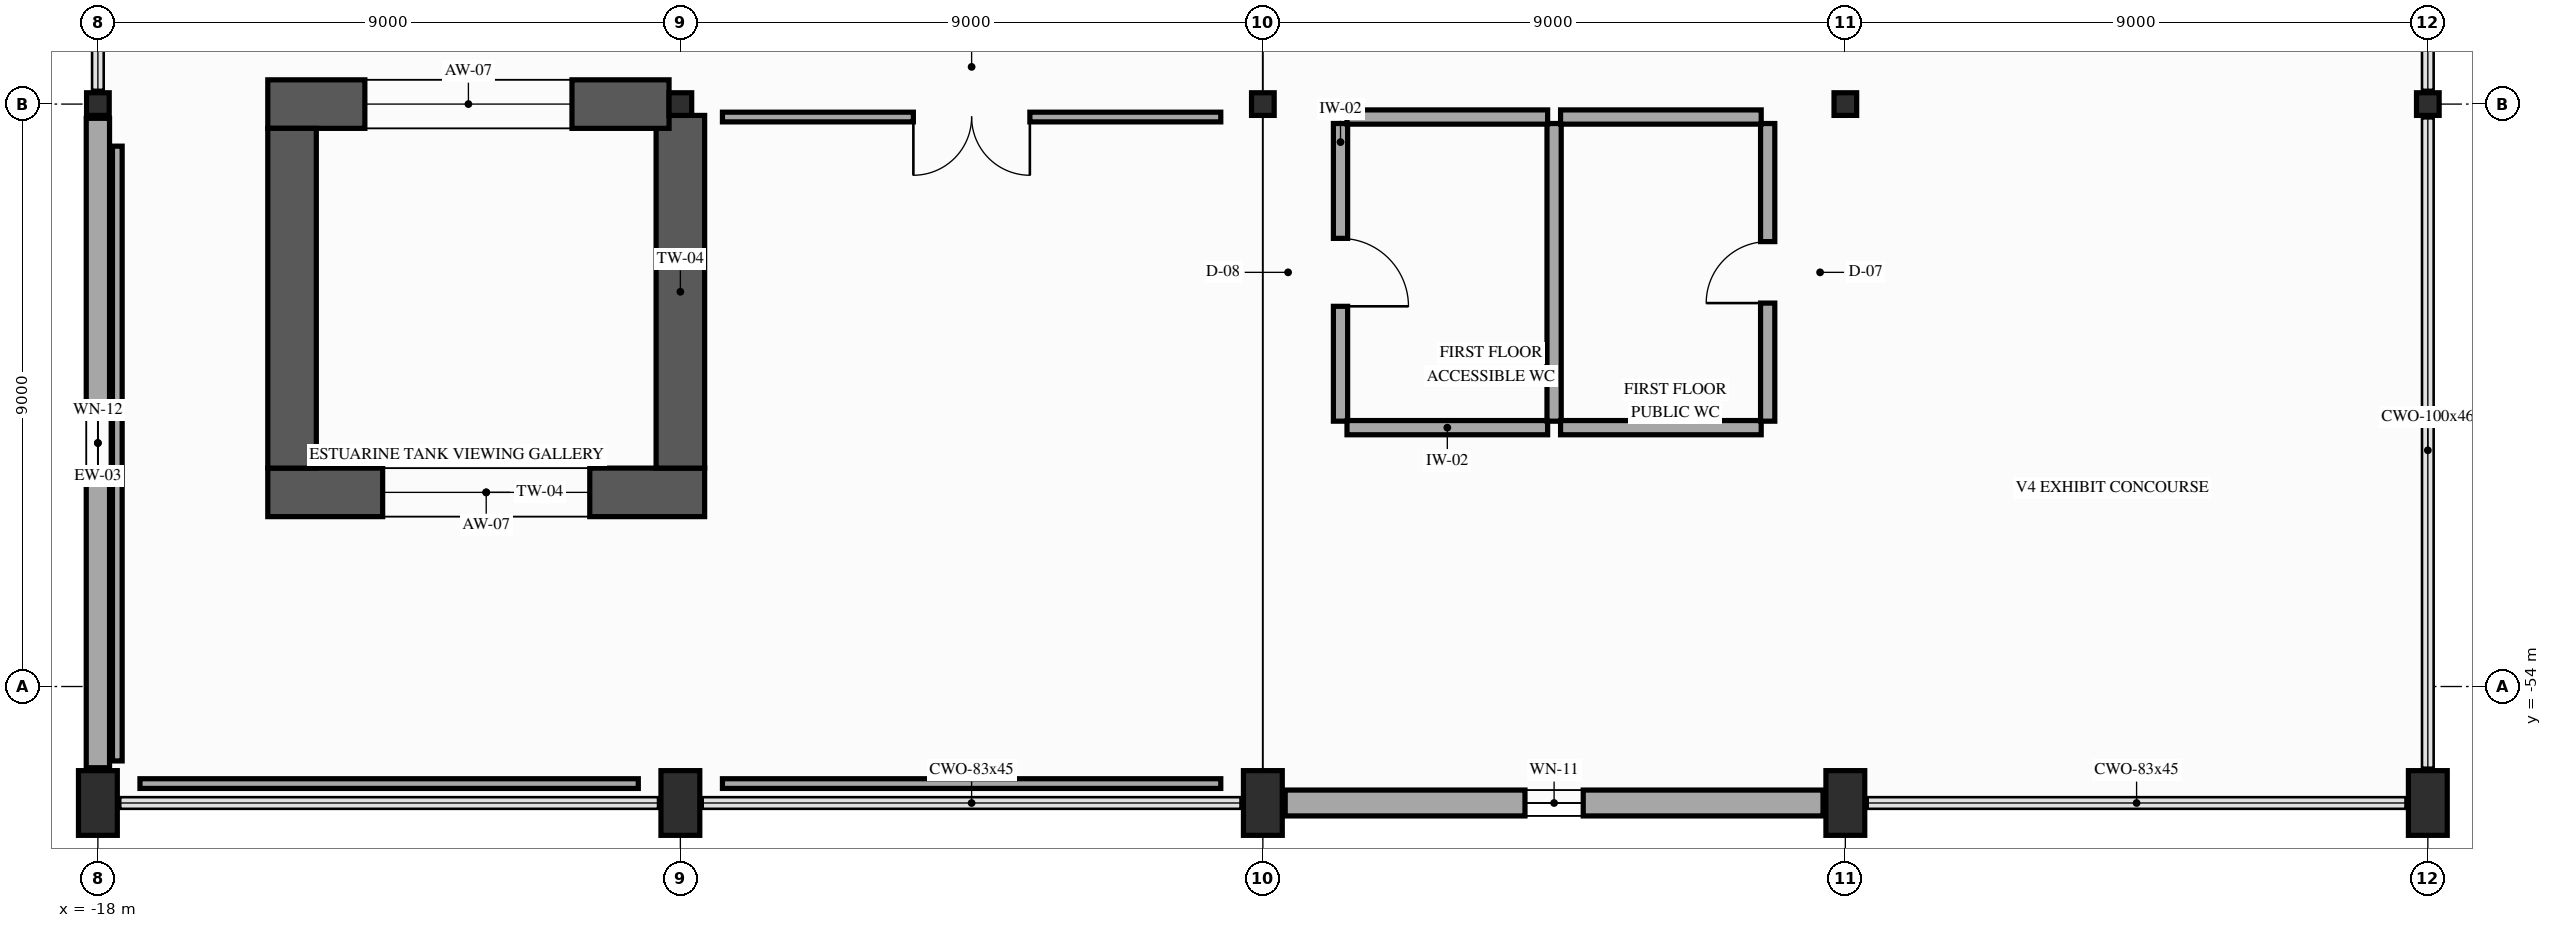
"""IFC4 building model, lengths in metres.
Left out: names, types, materials, properties, quantities, classifications, styles, units other than length and angle.
Written with IfcOpenShell. Run it as: python <this file> out.ifc"""

import sys

from ifc_helpers import new_model, si_unit, direction, frame, frame_2d, origin, origin_2d, place, context, subcontext, project, spatial, rectangle, i_section, extrude, element, fill, save


model = new_model("IFC4")
c1 = context("Model", 3, precision=1e-05, world=origin(), true_north=direction((0.0, 1.0)))
c2 = subcontext(c1, "Body", "Model", "MODEL_VIEW")
j1 = project(units=[si_unit("LENGTHUNIT", "METRE"), si_unit("PLANEANGLEUNIT", "RADIAN")], contexts=[c1])
p1 = place(None, origin())
s1 = spatial("IfcSite", under=j1, at=p1, CompositionType="ELEMENT")
p2 = place(p1, origin())
s2 = spatial("IfcBuilding", under=s1, at=p2, CompositionType="ELEMENT")
p3 = place(p2, frame((0.0, 0.0, 5.4)))
s3 = spatial("IfcBuildingStorey", under=s2, at=p3, CompositionType="ELEMENT", Elevation=5.4)
p4 = place(p3, frame((-18.0, -55.8, 0.0), z_axis=(0.0, 0.0, 1.0), x_axis=(1.0, 0.0, 0.0)))
e1 = element("IfcColumn", 1, at=p4, inside=s3, PredefinedType="PILASTER", context=c2, shape_type="SweptSolid", body=[
    extrude(rectangle(XDim=0.6, YDim=1.0, at=origin_2d()), origin(), (0.0, 0.0, 1.0), 5.4),
])
p5 = place(p3, frame((-18.0, -45.0, 0.0), z_axis=(0.0, 0.0, 1.0), x_axis=(1.0, 0.0, 0.0)))
e2 = element("IfcColumn", 2, at=p5, inside=s3, PredefinedType="COLUMN", context=c2, shape_type="SweptSolid", body=[
    extrude(i_section(OverallWidth=0.35, OverallDepth=0.35, WebThickness=0.012, FlangeThickness=0.019, FilletRadius=0.02, at=origin_2d()), origin(), (0.0, 0.0, 1.0), 5.4),
])
p6 = place(p3, frame((-9.0, -55.8, 0.0), z_axis=(0.0, 0.0, 1.0), x_axis=(1.0, 0.0, 0.0)))
e3 = element("IfcColumn", 3, at=p6, inside=s3, PredefinedType="PILASTER", context=c2, shape_type="SweptSolid", body=[
    extrude(rectangle(XDim=0.6, YDim=1.0, at=origin_2d()), origin(), (0.0, 0.0, 1.0), 5.4),
])
p7 = place(p3, frame((-9.0, -45.0, 0.0), z_axis=(0.0, 0.0, 1.0), x_axis=(1.0, 0.0, 0.0)))
e4 = element("IfcColumn", 4, at=p7, inside=s3, PredefinedType="COLUMN", context=c2, shape_type="SweptSolid", body=[
    extrude(i_section(OverallWidth=0.35, OverallDepth=0.35, WebThickness=0.012, FlangeThickness=0.019, FilletRadius=0.02, at=origin_2d()), origin(), (0.0, 0.0, 1.0), 5.4),
])
p8 = place(p3, frame((0.0, -55.8, 0.0), z_axis=(0.0, 0.0, 1.0), x_axis=(1.0, 0.0, 0.0)))
e5 = element("IfcColumn", 5, at=p8, inside=s3, PredefinedType="PILASTER", context=c2, shape_type="SweptSolid", body=[
    extrude(rectangle(XDim=0.6, YDim=1.0, at=origin_2d()), origin(), (0.0, 0.0, 1.0), 5.4),
])
p9 = place(p3, frame((0.0, -45.0, 0.0), z_axis=(0.0, 0.0, 1.0), x_axis=(1.0, 0.0, 0.0)))
e6 = element("IfcColumn", 6, at=p9, inside=s3, PredefinedType="COLUMN", context=c2, shape_type="SweptSolid", body=[
    extrude(i_section(OverallWidth=0.35, OverallDepth=0.35, WebThickness=0.012, FlangeThickness=0.019, FilletRadius=0.02, at=origin_2d()), origin(), (0.0, 0.0, 1.0), 5.4),
])
p10 = place(p3, frame((9.0, -55.8, 0.0), z_axis=(0.0, 0.0, 1.0), x_axis=(1.0, 0.0, 0.0)))
e7 = element("IfcColumn", 7, at=p10, inside=s3, PredefinedType="PILASTER", context=c2, shape_type="SweptSolid", body=[
    extrude(rectangle(XDim=0.6, YDim=1.0, at=origin_2d()), origin(), (0.0, 0.0, 1.0), 5.4),
])
p11 = place(p3, frame((9.0, -45.0, 0.0), z_axis=(0.0, 0.0, 1.0), x_axis=(1.0, 0.0, 0.0)))
e8 = element("IfcColumn", 8, at=p11, inside=s3, PredefinedType="COLUMN", context=c2, shape_type="SweptSolid", body=[
    extrude(i_section(OverallWidth=0.35, OverallDepth=0.35, WebThickness=0.012, FlangeThickness=0.019, FilletRadius=0.02, at=origin_2d()), origin(), (0.0, 0.0, 1.0), 5.4),
])
p12 = place(p3, frame((18.0, -55.8, 0.0), z_axis=(0.0, 0.0, 1.0), x_axis=(1.0, 0.0, 0.0)))
e9 = element("IfcColumn", 9, at=p12, inside=s3, PredefinedType="PILASTER", context=c2, shape_type="SweptSolid", body=[
    extrude(rectangle(XDim=0.6, YDim=1.0, at=origin_2d()), origin(), (0.0, 0.0, 1.0), 5.4),
])
p13 = place(p3, frame((18.0, -45.0, 0.0), z_axis=(0.0, 0.0, 1.0), x_axis=(1.0, 0.0, 0.0)))
e10 = element("IfcColumn", 10, at=p13, inside=s3, PredefinedType="COLUMN", context=c2, shape_type="SweptSolid", body=[
    extrude(i_section(OverallWidth=0.35, OverallDepth=0.35, WebThickness=0.012, FlangeThickness=0.019, FilletRadius=0.02, at=origin_2d()), origin(), (0.0, 0.0, 1.0), 5.4),
])
p14 = place(p3, frame((-15.375, -51.0, 0.0), z_axis=(0.0, 0.0, 1.0), x_axis=(1.0, 0.0, 0.0)))
e11 = element("IfcWall", 11, at=p14, inside=s3, PredefinedType="SHEAR", context=c2, shape_type="SweptSolid", body=[
    extrude(rectangle(XDim=6.75, YDim=0.75, at=frame_2d((3.375, 0.0))), origin(), (0.0, 0.0, 1.0), 4.5),
])
p15 = place(p14, frame((1.775, 0.0, 0.8)))
e12 = element("IfcOpeningElement", 12, at=p15, cuts=e11, PredefinedType="OPENING", context=c2, shape_type="SweptSolid", body=[
    extrude(rectangle(XDim=3.2, YDim=2.2, at=frame_2d((1.6, 1.1))), frame((0.0, 0.385, 0.0), z_axis=(0.0, -1.0, 0.0), x_axis=(1.0, 0.0, 0.0)), (0.0, 0.0, 1.0), 0.77),
])
p16 = place(p3, frame((-9.0, -50.625, 0.0), z_axis=(0.0, 0.0, 1.0), x_axis=(0.0, 1.0, 0.0)))
e13 = element("IfcWall", 13, at=p16, inside=s3, PredefinedType="SHEAR", context=c2, shape_type="SweptSolid", body=[
    extrude(rectangle(XDim=5.45, YDim=0.75, at=frame_2d((2.725, 0.0))), origin(), (0.0, 0.0, 1.0), 4.5),
])
p17 = place(p3, frame((-9.175, -45.0, 0.0), z_axis=(0.0, 0.0, 1.0), x_axis=(-1.0, 0.0, 0.0)))
e14 = element("IfcWall", 14, at=p17, inside=s3, PredefinedType="SHEAR", context=c2, shape_type="SweptSolid", body=[
    extrude(rectangle(XDim=6.2, YDim=0.75, at=frame_2d((3.1, 0.0))), origin(), (0.0, 0.0, 1.0), 4.5),
])
p18 = place(p17, frame((1.5, 0.0, 0.8)))
e15 = element("IfcOpeningElement", 15, at=p18, cuts=e14, PredefinedType="OPENING", context=c2, shape_type="SweptSolid", body=[
    extrude(rectangle(XDim=3.2, YDim=2.2, at=frame_2d((1.6, 1.1))), frame((0.0, 0.385, 0.0), z_axis=(0.0, -1.0, 0.0), x_axis=(1.0, 0.0, 0.0)), (0.0, 0.0, 1.0), 0.77),
])
p19 = place(p3, frame((-15.0, -45.375, 0.0), z_axis=(0.0, 0.0, 1.0), x_axis=(0.0, -1.0, 0.0)))
e16 = element("IfcWall", 16, at=p19, inside=s3, PredefinedType="SHEAR", context=c2, shape_type="SweptSolid", body=[
    extrude(rectangle(XDim=5.25, YDim=0.75, at=frame_2d((2.625, 0.0))), origin(), (0.0, 0.0, 1.0), 4.5),
])
p20 = place(p3, frame((8.655, -55.8, 0.0), z_axis=(0.0, 0.0, 1.0), x_axis=(-1.0, 0.0, 0.0)))
e17 = element("IfcWall", 17, at=p20, inside=s3, PredefinedType="SOLIDWALL", context=c2, shape_type="SweptSolid", body=[
    extrude(rectangle(XDim=8.31, YDim=0.4, at=frame_2d((4.155, 0.0))), origin(), (0.0, 0.0, 1.0), 4.537),
])
p21 = place(p20, frame((3.705, 0.0, 0.9)))
e18 = element("IfcOpeningElement", 18, at=p21, cuts=e17, PredefinedType="OPENING", context=c2, shape_type="SweptSolid", body=[
    extrude(rectangle(XDim=0.9, YDim=2.2, at=frame_2d((0.45, 1.1))), frame((0.0, 0.21, 0.0), z_axis=(0.0, -1.0, 0.0), x_axis=(1.0, 0.0, 0.0)), (0.0, 0.0, 1.0), 0.42),
])
p22 = place(p3, frame((-18.0, -55.255, 0.0), z_axis=(0.0, 0.0, 1.0), x_axis=(0.0, 1.0, 0.0)))
e19 = element("IfcWall", 19, at=p22, inside=s3, PredefinedType="SOLIDWALL", context=c2, shape_type="SweptSolid", body=[
    extrude(rectangle(XDim=10.035, YDim=0.36, at=frame_2d((5.018, 0.0))), origin(), (0.0, 0.0, 1.0), 4.537),
])
p23 = place(p22, frame((4.493, 0.0, 0.9)))
e20 = element("IfcOpeningElement", 20, at=p23, cuts=e19, PredefinedType="OPENING", context=c2, shape_type="SweptSolid", body=[
    extrude(rectangle(XDim=1.05, YDim=2.0, at=frame_2d((0.525, 1.0))), frame((0.0, 0.19, 0.0), z_axis=(0.0, -1.0, 0.0), x_axis=(1.0, 0.0, 0.0)), (0.0, 0.0, 1.0), 0.38),
])
p24 = place(p3, frame((1.2, -45.3, 0.0), z_axis=(0.0, 0.0, 1.0), x_axis=(0.0, -1.0, 0.0)))
e21 = element("IfcWall", 21, at=p24, inside=s3, PredefinedType="PLUMBINGWALL", context=c2, shape_type="SweptSolid", body=[
    extrude(rectangle(XDim=4.6, YDim=0.22, at=frame_2d((2.3, 0.0))), origin(), (0.0, 0.0, 1.0), 4.537),
])
p25 = place(p24, frame((1.775, 0.0, 0.0)))
e22 = element("IfcOpeningElement", 22, at=p25, cuts=e21, PredefinedType="OPENING", context=c2, shape_type="SweptSolid", body=[
    extrude(rectangle(XDim=1.05, YDim=2.15, at=frame_2d((0.525, 1.075))), frame((0.0, 0.12, 0.0), z_axis=(0.0, -1.0, 0.0), x_axis=(1.0, 0.0, 0.0)), (0.0, 0.0, 1.0), 0.24),
])
p26 = place(p3, frame((1.3, -50.0, 0.0), z_axis=(0.0, 0.0, 1.0), x_axis=(1.0, 0.0, 0.0)))
e23 = element("IfcWall", 23, at=p26, inside=s3, PredefinedType="PLUMBINGWALL", context=c2, shape_type="SweptSolid", body=[
    extrude(rectangle(XDim=3.1, YDim=0.22, at=frame_2d((1.55, 0.0))), origin(), (0.0, 0.0, 1.0), 5.05),
])
p27 = place(p3, frame((4.5, -49.9, 0.0), z_axis=(0.0, 0.0, 1.0), x_axis=(0.0, 1.0, 0.0)))
e24 = element("IfcWall", 24, at=p27, inside=s3, PredefinedType="PLUMBINGWALL", context=c2, shape_type="SweptSolid", body=[
    extrude(rectangle(XDim=4.6, YDim=0.22, at=frame_2d((2.3, 0.0))), origin(), (0.0, 0.0, 1.0), 4.537),
])
p28 = place(p3, frame((4.4, -45.2, 0.0), z_axis=(0.0, 0.0, 1.0), x_axis=(-1.0, 0.0, 0.0)))
e25 = element("IfcWall", 25, at=p28, inside=s3, PredefinedType="PLUMBINGWALL", context=c2, shape_type="SweptSolid", body=[
    extrude(rectangle(XDim=3.1, YDim=0.22, at=frame_2d((1.55, 0.0))), origin(), (0.0, 0.0, 1.0), 4.537),
])
p29 = place(p3, frame((4.6, -50.0, 0.0), z_axis=(0.0, 0.0, 1.0), x_axis=(1.0, 0.0, 0.0)))
e26 = element("IfcWall", 26, at=p29, inside=s3, PredefinedType="PLUMBINGWALL", context=c2, shape_type="SweptSolid", body=[
    extrude(rectangle(XDim=3.1, YDim=0.22, at=frame_2d((1.55, 0.0))), origin(), (0.0, 0.0, 1.0), 5.05),
])
p30 = place(p3, frame((7.8, -49.9, 0.0), z_axis=(0.0, 0.0, 1.0), x_axis=(0.0, 1.0, 0.0)))
e27 = element("IfcWall", 27, at=p30, inside=s3, PredefinedType="PLUMBINGWALL", context=c2, shape_type="SweptSolid", body=[
    extrude(rectangle(XDim=4.6, YDim=0.22, at=frame_2d((2.3, 0.0))), origin(), (0.0, 0.0, 1.0), 4.537),
])
p31 = place(p30, frame((1.825, 0.0, 0.0)))
e28 = element("IfcOpeningElement", 28, at=p31, cuts=e27, PredefinedType="OPENING", context=c2, shape_type="SweptSolid", body=[
    extrude(rectangle(XDim=0.95, YDim=2.15, at=frame_2d((0.475, 1.075))), frame((0.0, 0.12, 0.0), z_axis=(0.0, -1.0, 0.0), x_axis=(1.0, 0.0, 0.0)), (0.0, 0.0, 1.0), 0.24),
])
p32 = place(p3, frame((7.7, -45.2, 0.0), z_axis=(0.0, 0.0, 1.0), x_axis=(-1.0, 0.0, 0.0)))
e29 = element("IfcWall", 29, at=p32, inside=s3, PredefinedType="PLUMBINGWALL", context=c2, shape_type="SweptSolid", body=[
    extrude(rectangle(XDim=3.1, YDim=0.22, at=frame_2d((1.55, 0.0))), origin(), (0.0, 0.0, 1.0), 4.537),
])
for number, where, z_axis, x_axis in (
    (30, (-17.35, -55.5, 0.0), (0.0, 0.0, 1.0), (1.0, 0.0, 0.0)),
    (31, (-8.35, -55.5, 0.0), (0.0, 0.0, 1.0), (1.0, 0.0, 0.0)),
):
    element("IfcWall", number, at=place(p3, frame(where, z_axis=z_axis, x_axis=x_axis)), inside=s3, PredefinedType="PARTITIONING", context=c2, shape_type="SweptSolid", body=[
        extrude(rectangle(XDim=7.7, YDim=0.15, at=frame_2d((3.85, 0.0))), origin(), (0.0, 0.0, 1.0), 4.537),
    ])
p33 = place(p3, frame((-0.65, -45.2, 0.0), z_axis=(0.0, 0.0, 1.0), x_axis=(-1.0, 0.0, 0.0)))
e32 = element("IfcWall", 32, at=p33, inside=s3, PredefinedType="PARTITIONING", context=c2, shape_type="SweptSolid", body=[
    extrude(rectangle(XDim=7.7, YDim=0.15, at=frame_2d((3.85, 0.0))), origin(), (0.0, 0.0, 1.0), 4.537),
])
p34 = place(p33, frame((2.95, 0.0, 0.0)))
e33 = element("IfcOpeningElement", 33, at=p34, cuts=e32, PredefinedType="OPENING", context=c2, shape_type="SweptSolid", body=[
    extrude(rectangle(XDim=1.8, YDim=2.3, at=frame_2d((0.9, 1.15))), frame((0.0, 0.085, 0.0), z_axis=(0.0, -1.0, 0.0), x_axis=(1.0, 0.0, 0.0)), (0.0, 0.0, 1.0), 0.17),
])
p35 = place(p3, frame((-17.7, -45.65, 0.0), z_axis=(0.0, 0.0, 1.0), x_axis=(0.0, -1.0, 0.0)))
e34 = element("IfcWall", 34, at=p35, inside=s3, PredefinedType="PARTITIONING", context=c2, shape_type="SweptSolid", body=[
    extrude(rectangle(XDim=9.5, YDim=0.15, at=frame_2d((4.75, 0.0))), origin(), (0.0, 0.0, 1.0), 4.637),
])
p36 = place(p15, origin())
e35 = element("IfcWindow", 35, at=p36, inside=s3, PartitioningType="SINGLE_PANEL", PredefinedType="WINDOW", context=c2, shape_type="SweptSolid", body=[
    extrude(rectangle(XDim=3.2, YDim=2.2, at=frame_2d((1.6, 1.1))), frame((0.0, 0.03, 0.0), z_axis=(0.0, -1.0, 0.0), x_axis=(1.0, 0.0, 0.0)), (0.0, 0.0, 1.0), 0.06),
])
fill(e12, e35)
p37 = place(p18, origin())
e36 = element("IfcWindow", 36, at=p37, inside=s3, PartitioningType="SINGLE_PANEL", PredefinedType="WINDOW", context=c2, shape_type="SweptSolid", body=[
    extrude(rectangle(XDim=3.2, YDim=2.2, at=frame_2d((1.6, 1.1))), frame((0.0, 0.03, 0.0), z_axis=(0.0, -1.0, 0.0), x_axis=(1.0, 0.0, 0.0)), (0.0, 0.0, 1.0), 0.06),
])
fill(e15, e36)
p38 = place(p21, origin())
e37 = element("IfcWindow", 37, at=p38, inside=s3, PartitioningType="SINGLE_PANEL", PredefinedType="WINDOW", context=c2, shape_type="SweptSolid", body=[
    extrude(rectangle(XDim=0.9, YDim=2.2, at=frame_2d((0.45, 1.1))), frame((0.0, 0.03, 0.0), z_axis=(0.0, -1.0, 0.0), x_axis=(1.0, 0.0, 0.0)), (0.0, 0.0, 1.0), 0.06),
])
fill(e18, e37)
p39 = place(p23, origin())
e38 = element("IfcWindow", 38, at=p39, inside=s3, PartitioningType="SINGLE_PANEL", PredefinedType="WINDOW", context=c2, shape_type="SweptSolid", body=[
    extrude(rectangle(XDim=1.05, YDim=2.0, at=frame_2d((0.525, 1.0))), frame((0.0, 0.03, 0.0), z_axis=(0.0, -1.0, 0.0), x_axis=(1.0, 0.0, 0.0)), (0.0, 0.0, 1.0), 0.06),
])
fill(e20, e38)
p40 = place(p25, origin())
e39 = element("IfcDoor", 39, at=p40, inside=s3, OperationType="SINGLE_SWING_RIGHT", PredefinedType="DOOR", context=c2, shape_type="SweptSolid", body=[
    extrude(rectangle(XDim=1.05, YDim=2.15, at=frame_2d((0.525, 1.075))), frame((0.0, 0.025, 0.0), z_axis=(0.0, -1.0, 0.0), x_axis=(1.0, 0.0, 0.0)), (0.0, 0.0, 1.0), 0.05),
])
fill(e22, e39)
p41 = place(p31, origin())
e40 = element("IfcDoor", 40, at=p41, inside=s3, OperationType="SINGLE_SWING_LEFT", PredefinedType="DOOR", context=c2, shape_type="SweptSolid", body=[
    extrude(rectangle(XDim=0.95, YDim=2.15, at=frame_2d((0.475, 1.075))), frame((0.0, 0.025, 0.0), z_axis=(0.0, -1.0, 0.0), x_axis=(1.0, 0.0, 0.0)), (0.0, 0.0, 1.0), 0.05),
])
fill(e28, e40)
p42 = place(p34, origin())
e41 = element("IfcDoor", 41, at=p42, inside=s3, OperationType="DOUBLE_DOOR_SINGLE_SWING", PredefinedType="DOOR", context=c2, shape_type="SweptSolid", body=[
    extrude(rectangle(XDim=1.8, YDim=2.3, at=frame_2d((0.9, 1.15))), frame((0.0, 0.025, 0.0), z_axis=(0.0, -1.0, 0.0), x_axis=(1.0, 0.0, 0.0)), (0.0, 0.0, 1.0), 0.05),
])
fill(e33, e41)
save(model, sys.argv[1])
